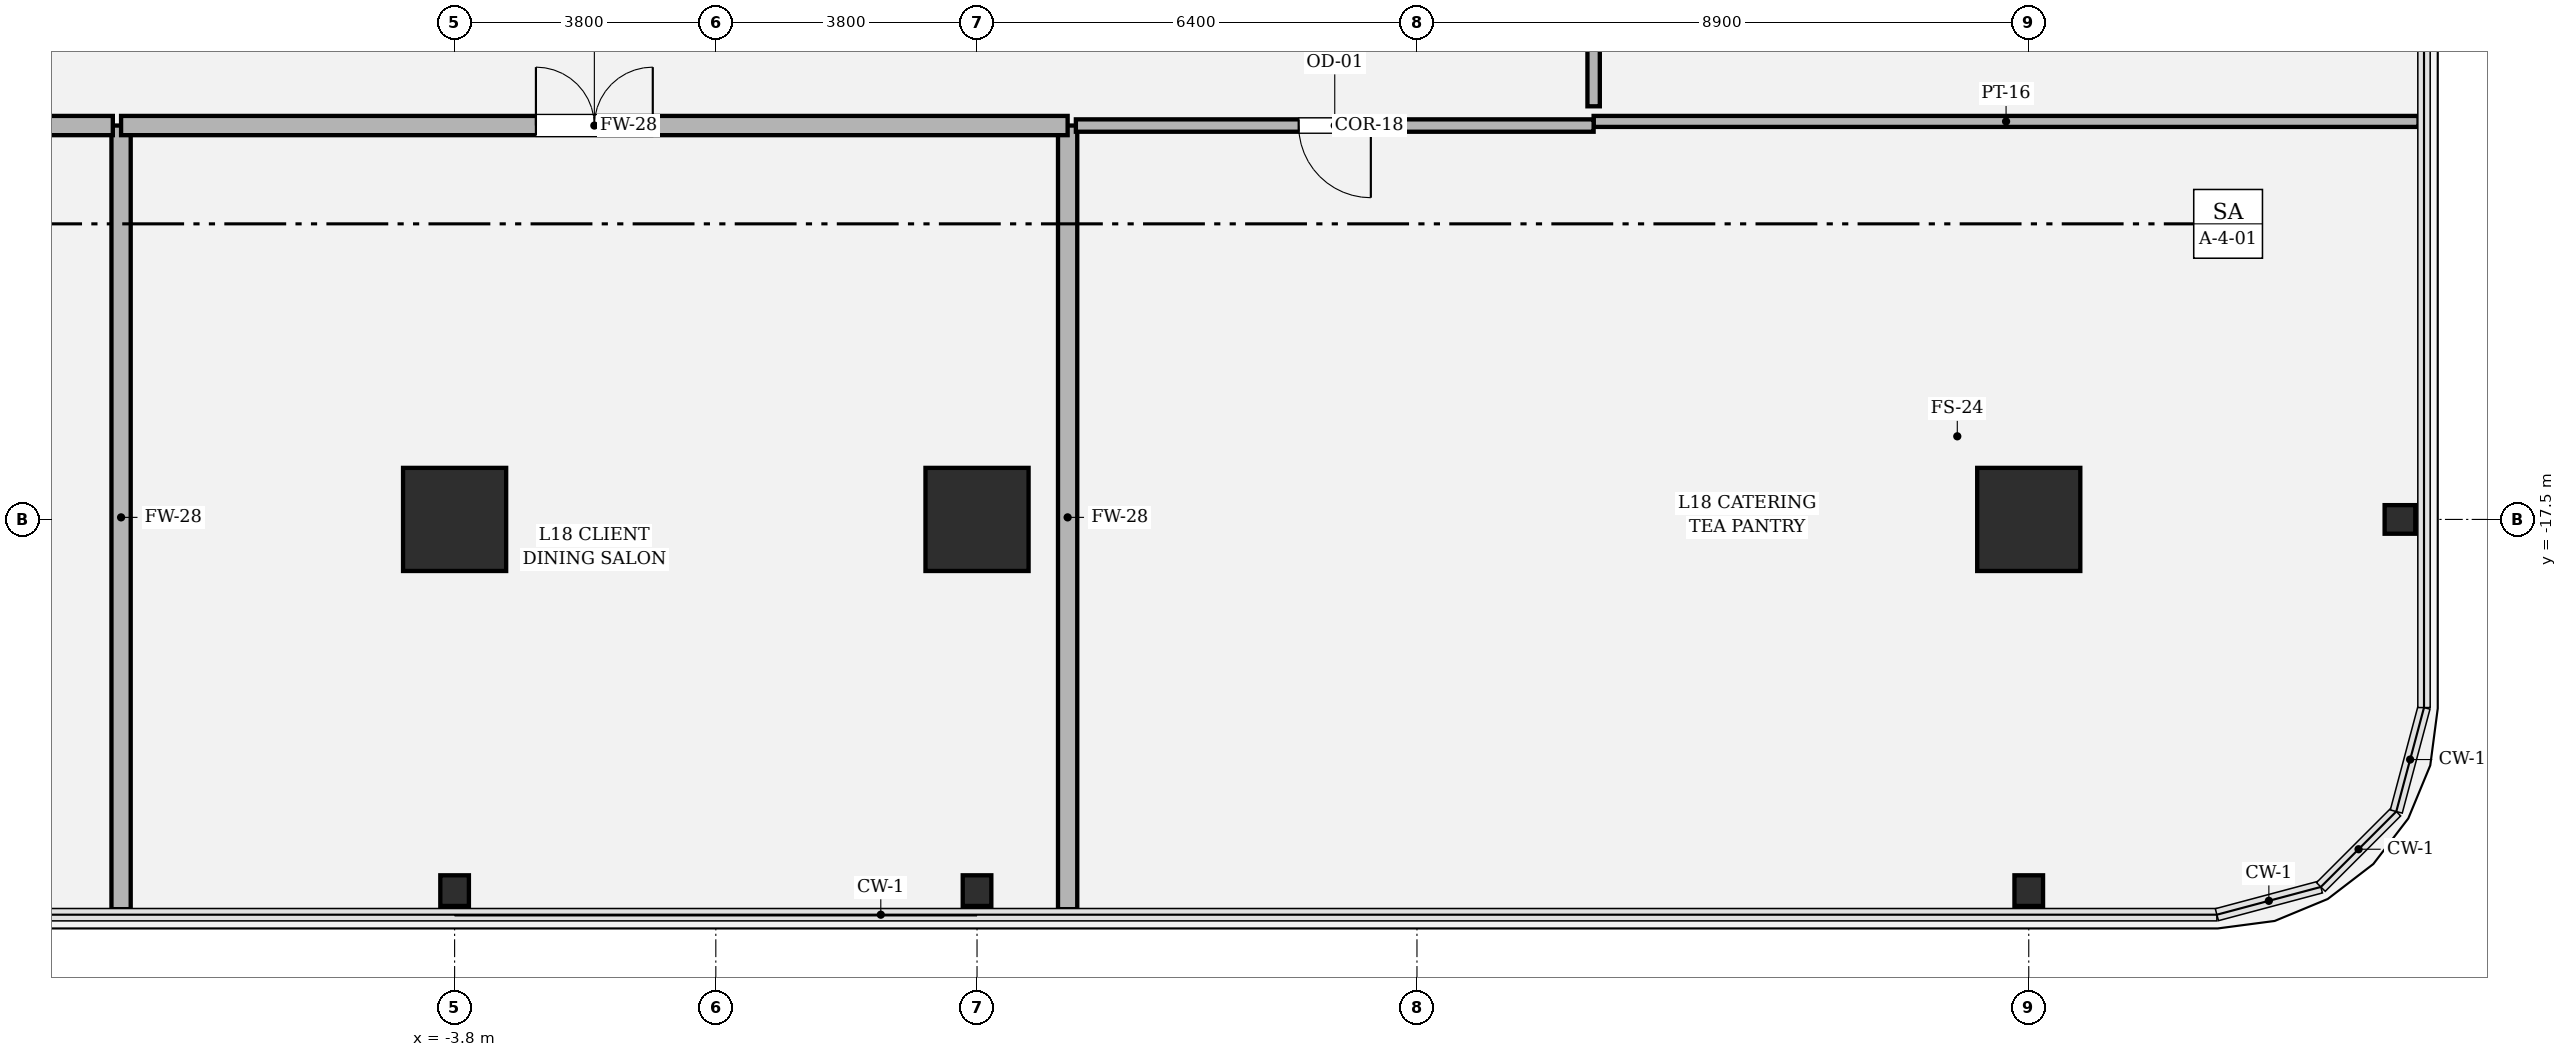
"""IFC4 building model, lengths in metres.
Left out: names, types, materials, properties, quantities, classifications, styles, units other than length and angle.
Written with IfcOpenShell. Run it as: python <this file> out.ifc"""

import sys

from ifc_helpers import new_model, si_unit, direction, frame, frame_2d, origin, origin_2d, place, context, subcontext, project, spatial, rectangle, hollow_rectangle, i_section, extrude, element, fill, save


model = new_model("IFC4")
c1 = context("Model", 3, precision=1e-05, world=origin(), true_north=direction((0.0, 1.0)))
c2 = subcontext(c1, "Body", "Model", "MODEL_VIEW")
j1 = project(units=[si_unit("LENGTHUNIT", "METRE"), si_unit("PLANEANGLEUNIT", "RADIAN")], contexts=[c1])
p1 = place(None, origin())
s1 = spatial("IfcSite", under=j1, at=p1, CompositionType="ELEMENT")
p2 = place(p1, origin())
s2 = spatial("IfcBuilding", under=s1, at=p2, CompositionType="ELEMENT")
p3 = place(p2, frame((0.0, 0.0, 80.85)))
s3 = spatial("IfcBuildingStorey", under=s2, at=p3, CompositionType="ELEMENT", Elevation=80.85)
for number, where, z_axis, x_axis in (
    (1, (-3.8, -17.5, 0.0), (0.0, 0.0, 1.0), (1.0, 0.0, 0.0)),
    (2, (3.8, -17.5, 0.0), (0.0, 0.0, 1.0), (1.0, 0.0, 0.0)),
    (3, (19.1, -17.5, 0.0), (0.0, 0.0, 1.0), (1.0, 0.0, 0.0)),
):
    element("IfcColumn", number, at=place(p3, frame(where, z_axis=z_axis, x_axis=x_axis)), inside=s3, PredefinedType="COLUMN", context=c2, shape_type="SweptSolid", body=[
        extrude(hollow_rectangle(XDim=1.5, YDim=1.5, WallThickness=0.045, at=origin_2d()), origin(), (0.0, 0.0, 1.0), 4.05),
    ])
for number, where, z_axis, x_axis in (
    (4, (-3.8, -22.9, 0.0), (0.0, 0.0, 1.0), (1.0, 0.0, 0.0)),
    (5, (3.8, -22.9, 0.0), (0.0, 0.0, 1.0), (1.0, 0.0, 0.0)),
    (6, (19.1, -22.9, 0.0), (0.0, 0.0, 1.0), (1.0, 0.0, 0.0)),
    (7, (24.5, -17.5, 0.0), (0.0, 0.0, 1.0), (0.0, 1.0, 0.0)),
):
    element("IfcColumn", number, at=place(p3, frame(where, z_axis=z_axis, x_axis=x_axis)), inside=s3, PredefinedType="COLUMN", context=c2, shape_type="SweptSolid", body=[
        extrude(i_section(OverallWidth=0.416, OverallDepth=0.446, WebThickness=0.039, FlangeThickness=0.062, FilletRadius=0.018, at=origin_2d()), origin(), (0.0, 0.0, 1.0), 4.048),
    ])
for number, where, z_axis, x_axis in (
    (8, (5.118, -11.77, 0.0), (0.0, 0.0, 1.0), (0.0, -1.0, 0.0)),
    (9, (-8.652, -23.17, 0.0), (0.0, 0.0, 1.0), (0.0, 1.0, 0.0)),
):
    element("IfcWall", number, at=place(p3, frame(where, z_axis=z_axis, x_axis=x_axis)), inside=s3, PredefinedType="SOLIDWALL", context=c2, shape_type="SweptSolid", body=[
        extrude(rectangle(XDim=11.4, YDim=0.28, at=frame_2d((5.7, 0.0))), origin(), (0.0, 0.0, 1.0), 2.524),
    ])
p4 = place(p3, frame((-8.652, -11.77, 0.0), z_axis=(0.0, 0.0, 1.0), x_axis=(1.0, 0.0, 0.0)))
e10 = element("IfcWall", 10, at=p4, inside=s3, PredefinedType="SOLIDWALL", context=c2, shape_type="SweptSolid", body=[
    extrude(rectangle(XDim=13.77, YDim=0.28, at=frame_2d((6.885, 0.0))), origin(), (0.0, 0.0, 1.0), 3.104),
])
p5 = place(p4, frame((6.035, 0.0, 0.0)))
e11 = element("IfcOpeningElement", 11, at=p5, cuts=e10, PredefinedType="OPENING", context=c2, shape_type="SweptSolid", body=[
    extrude(rectangle(XDim=1.7, YDim=2.3, at=frame_2d((0.85, 1.15))), frame((0.0, 0.15, 0.0), z_axis=(0.0, -1.0, 0.0), x_axis=(1.0, 0.0, 0.0)), (0.0, 0.0, 1.0), 0.3),
])
p6 = place(p3, frame((-16.27, -11.77, 0.0), z_axis=(0.0, 0.0, 1.0), x_axis=(1.0, 0.0, 0.0)))
e12 = element("IfcWall", 12, at=p6, inside=s3, PredefinedType="SOLIDWALL", context=c2, shape_type="SweptSolid", body=[
    extrude(rectangle(XDim=7.498, YDim=0.28, at=frame_2d((3.749, 0.0))), origin(), (0.0, 0.0, 1.0), 3.104),
])
p7 = place(p6, frame((2.899, 0.0, 0.0)))
e13 = element("IfcOpeningElement", 13, at=p7, cuts=e12, PredefinedType="OPENING", context=c2, shape_type="SweptSolid", body=[
    extrude(rectangle(XDim=1.7, YDim=2.3, at=frame_2d((0.85, 1.15))), frame((0.0, 0.15, 0.0), z_axis=(0.0, -1.0, 0.0), x_axis=(1.0, 0.0, 0.0)), (0.0, 0.0, 1.0), 0.3),
])
p8 = place(p3, frame((12.77, -11.71, 0.0), z_axis=(0.0, 0.0, 1.0), x_axis=(1.0, 0.0, 0.0)))
e14 = element("IfcWall", 14, at=p8, inside=s3, PredefinedType="PARTITIONING", context=c2, shape_type="SweptSolid", body=[
    extrude(rectangle(XDim=12.0, YDim=0.16, at=frame_2d((6.0, 0.0))), origin(), (0.0, 0.0, 1.0), 2.524),
])
p9 = place(p3, frame((5.238, -11.77, 0.0), z_axis=(0.0, 0.0, 1.0), x_axis=(1.0, 0.0, 0.0)))
e15 = element("IfcWall", 15, at=p9, inside=s3, PredefinedType="PARTITIONING", context=c2, shape_type="SweptSolid", body=[
    extrude(rectangle(XDim=7.532, YDim=0.18, at=frame_2d((3.766, 0.0))), origin(), (0.0, 0.0, 1.0), 3.104),
])
p10 = place(p9, frame((3.241, 0.0, 0.0)))
e16 = element("IfcOpeningElement", 16, at=p10, cuts=e15, PredefinedType="OPENING", context=c2, shape_type="SweptSolid", body=[
    extrude(rectangle(XDim=1.05, YDim=2.2, at=frame_2d((0.525, 1.1))), frame((0.0, 0.1, 0.0), z_axis=(0.0, -1.0, 0.0), x_axis=(1.0, 0.0, 0.0)), (0.0, 0.0, 1.0), 0.2),
])
p11 = place(p3, frame((12.77, -11.49, 0.0), z_axis=(0.0, 0.0, 1.0), x_axis=(0.0, 1.0, 0.0)))
e17 = element("IfcWall", 17, at=p11, inside=s3, PredefinedType="PARTITIONING", context=c2, shape_type="SweptSolid", body=[
    extrude(rectangle(XDim=10.29, YDim=0.18, at=frame_2d((5.145, 0.0))), origin(), (0.0, 0.0, 1.0), 3.104),
])
p12 = place(p5, origin())
e18 = element("IfcDoor", 18, at=p12, inside=s3, OperationType="DOUBLE_DOOR_SINGLE_SWING", PredefinedType="DOOR", context=c2, shape_type="SweptSolid", body=[
    extrude(rectangle(XDim=1.7, YDim=2.3, at=frame_2d((0.85, 1.15))), frame((0.0, 0.025, 0.0), z_axis=(0.0, -1.0, 0.0), x_axis=(1.0, 0.0, 0.0)), (0.0, 0.0, 1.0), 0.05),
])
fill(e11, e18)
p13 = place(p10, origin())
e19 = element("IfcDoor", 19, at=p13, inside=s3, OperationType="SINGLE_SWING_RIGHT", PredefinedType="DOOR", context=c2, shape_type="SweptSolid", body=[
    extrude(rectangle(XDim=1.05, YDim=2.2, at=frame_2d((0.525, 1.1))), frame((0.0, 0.025, 0.0), z_axis=(0.0, -1.0, 0.0), x_axis=(1.0, 0.0, 0.0)), (0.0, 0.0, 1.0), 0.05),
])
fill(e16, e19)
save(model, sys.argv[1])
